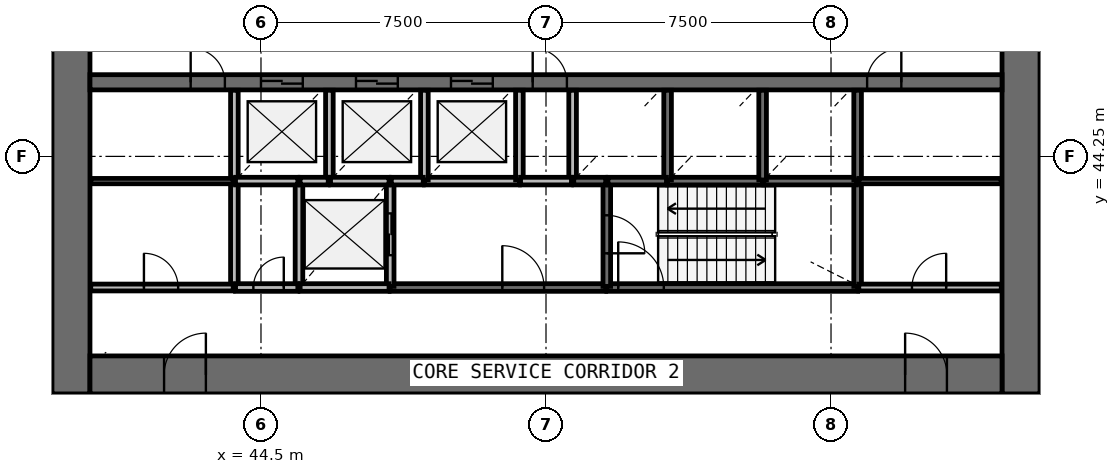
"""IFC4 building model, lengths in metres.
Left out: names, types, materials, properties, quantities, classifications, styles, units other than length and angle.
Written with IfcOpenShell. Run it as: python <this file> out.ifc"""

import sys

from ifc_helpers import new_model, si_unit, direction, frame, frame_2d, origin, place, context, subcontext, project, spatial, rectangle, extrude, source, transform, mapped, element, fill, save


model = new_model("IFC4")
c1 = context("Model", 3, precision=1e-05, world=origin(), true_north=direction((0.0, 1.0)))
c2 = subcontext(c1, "Body", "Model", "MODEL_VIEW")
j1 = project(units=[si_unit("LENGTHUNIT", "METRE"), si_unit("PLANEANGLEUNIT", "RADIAN")], contexts=[c1])
p1 = place(None, origin())
s1 = spatial("IfcSite", under=j1, at=p1, CompositionType="ELEMENT")
p2 = place(p1, origin())
s2 = spatial("IfcBuilding", under=s1, at=p2, CompositionType="ELEMENT")
p3 = place(p2, frame((0.0, 0.0, 49.0)))
s3 = spatial("IfcBuildingStorey", under=s2, at=p3, CompositionType="ELEMENT", Elevation=49.0)
p4 = place(p3, frame((64.5, 38.0, 0.0), z_axis=(0.0, 0.0, 1.0), x_axis=(0.0, 1.0, 0.0)))
e1 = element("IfcWall", 1, at=p4, inside=s3, PredefinedType="SHEAR", context=c2, shape_type="SweptSolid", body=[
    extrude(rectangle(XDim=20.0, YDim=1.0, at=frame_2d((10.0, 0.0))), origin(), (0.0, 0.0, 1.0), 4.4),
])
p5 = place(p4, frame((9.1, 0.0, 0.0)))
e2 = element("IfcOpeningElement", 2, at=p5, cuts=e1, PredefinedType="OPENING", context=c2, shape_type="SweptSolid", body=[
    extrude(rectangle(XDim=1.8, YDim=2.1, at=frame_2d((0.9, 1.05))), frame((0.0, 0.51, 0.0), z_axis=(0.0, -1.0, 0.0), x_axis=(1.0, 0.0, 0.0)), (0.0, 0.0, 1.0), 1.02),
])
p6 = place(p3, frame((39.5, 58.0, 0.0), z_axis=(0.0, 0.0, 1.0), x_axis=(0.0, -1.0, 0.0)))
e3 = element("IfcWall", 3, at=p6, inside=s3, PredefinedType="SHEAR", context=c2, shape_type="SweptSolid", body=[
    extrude(rectangle(XDim=20.0, YDim=1.0, at=frame_2d((10.0, 0.0))), origin(), (0.0, 0.0, 1.0), 4.4),
])
p7 = place(p6, frame((9.1, 0.0, 0.0)))
e4 = element("IfcOpeningElement", 4, at=p7, cuts=e3, PredefinedType="OPENING", context=c2, shape_type="SweptSolid", body=[
    extrude(rectangle(XDim=1.8, YDim=2.1, at=frame_2d((0.9, 1.05))), frame((0.0, 0.51, 0.0), z_axis=(0.0, -1.0, 0.0), x_axis=(1.0, 0.0, 0.0)), (0.0, 0.0, 1.0), 1.02),
])
p8 = place(p3, frame((40.0, 38.5, 0.0), z_axis=(0.0, 0.0, 1.0), x_axis=(1.0, 0.0, 0.0)))
e5 = element("IfcWall", 5, at=p8, inside=s3, PredefinedType="SHEAR", context=c2, shape_type="SweptSolid", body=[
    extrude(rectangle(XDim=24.0, YDim=1.0, at=frame_2d((12.0, 0.0))), origin(), (0.0, 0.0, 1.0), 4.4),
])
p9 = place(p8, frame((21.45, 0.0, 0.0)))
e6 = element("IfcOpeningElement", 6, at=p9, cuts=e5, PredefinedType="OPENING", context=c2, shape_type="SweptSolid", body=[
    extrude(rectangle(XDim=1.1, YDim=2.1, at=frame_2d((0.55, 1.05))), frame((0.0, 0.51, 0.0), z_axis=(0.0, -1.0, 0.0), x_axis=(1.0, 0.0, 0.0)), (0.0, 0.0, 1.0), 1.02),
])
p10 = place(p8, frame((1.95, 0.0, 0.0)))
e7 = element("IfcOpeningElement", 7, at=p10, cuts=e5, PredefinedType="OPENING", context=c2, shape_type="SweptSolid", body=[
    extrude(rectangle(XDim=1.1, YDim=2.1, at=frame_2d((0.55, 1.05))), frame((0.0, 0.51, 0.0), z_axis=(0.0, -1.0, 0.0), x_axis=(1.0, 0.0, 0.0)), (0.0, 0.0, 1.0), 1.02),
])
p11 = place(p3, frame((40.0, 46.2, 0.0), z_axis=(0.0, 0.0, 1.0), x_axis=(1.0, 0.0, 0.0)))
e8 = element("IfcWall", 8, at=p11, inside=s3, PredefinedType="SHEAR", context=c2, shape_type="SweptSolid", body=[
    extrude(rectangle(XDim=24.0, YDim=0.4, at=frame_2d((12.0, 0.0))), origin(), (0.0, 0.0, 1.0), 4.4),
])
p12 = place(p11, frame((4.5, 0.0, 0.0)))
e9 = element("IfcOpeningElement", 9, at=p12, cuts=e8, PredefinedType="OPENING", context=c2, shape_type="SweptSolid", body=[
    extrude(rectangle(XDim=1.1, YDim=2.1, at=frame_2d((0.55, 1.05))), frame((0.0, 0.21, 0.0), z_axis=(0.0, -1.0, 0.0), x_axis=(1.0, 0.0, 0.0)), (0.0, 0.0, 1.0), 0.42),
])
p13 = place(p11, frame((7.0, 0.0, 0.0)))
e10 = element("IfcOpeningElement", 10, at=p13, cuts=e8, PredefinedType="OPENING", context=c2, shape_type="SweptSolid", body=[
    extrude(rectangle(XDim=1.1, YDim=2.1, at=frame_2d((0.55, 1.05))), frame((0.0, 0.21, 0.0), z_axis=(0.0, -1.0, 0.0), x_axis=(1.0, 0.0, 0.0)), (0.0, 0.0, 1.0), 0.42),
])
p14 = place(p11, frame((9.5, 0.0, 0.0)))
e11 = element("IfcOpeningElement", 11, at=p14, cuts=e8, PredefinedType="OPENING", context=c2, shape_type="SweptSolid", body=[
    extrude(rectangle(XDim=1.1, YDim=2.1, at=frame_2d((0.55, 1.05))), frame((0.0, 0.21, 0.0), z_axis=(0.0, -1.0, 0.0), x_axis=(1.0, 0.0, 0.0)), (0.0, 0.0, 1.0), 0.42),
])
p15 = place(p11, frame((20.45, 0.0, 0.0)))
e12 = element("IfcOpeningElement", 12, at=p15, cuts=e8, PredefinedType="OPENING", context=c2, shape_type="SweptSolid", body=[
    extrude(rectangle(XDim=0.9, YDim=2.1, at=frame_2d((0.45, 1.05))), frame((0.0, 0.21, 0.0), z_axis=(0.0, -1.0, 0.0), x_axis=(1.0, 0.0, 0.0)), (0.0, 0.0, 1.0), 0.42),
])
p16 = place(p11, frame((2.65, 0.0, 0.0)))
e13 = element("IfcOpeningElement", 13, at=p16, cuts=e8, PredefinedType="OPENING", context=c2, shape_type="SweptSolid", body=[
    extrude(rectangle(XDim=0.9, YDim=2.1, at=frame_2d((0.45, 1.05))), frame((0.0, 0.21, 0.0), z_axis=(0.0, -1.0, 0.0), x_axis=(1.0, 0.0, 0.0)), (0.0, 0.0, 1.0), 0.42),
])
p17 = place(p11, frame((11.65, 0.0, 0.0)))
e14 = element("IfcOpeningElement", 14, at=p17, cuts=e8, PredefinedType="OPENING", context=c2, shape_type="SweptSolid", body=[
    extrude(rectangle(XDim=0.9, YDim=2.1, at=frame_2d((0.45, 1.05))), frame((0.0, 0.21, 0.0), z_axis=(0.0, -1.0, 0.0), x_axis=(1.0, 0.0, 0.0)), (0.0, 0.0, 1.0), 0.42),
])
p18 = place(p3, frame((53.6, 40.8, 0.0), z_axis=(0.0, 0.0, 1.0), x_axis=(1.0, 0.0, 0.0)))
e15 = element("IfcWall", 15, at=p18, inside=s3, PredefinedType="SOLIDWALL", context=c2, shape_type="SweptSolid", body=[
    extrude(rectangle(XDim=6.6, YDim=0.2, at=frame_2d((3.3, 0.0))), origin(), (0.0, 0.0, 1.0), 3.95),
])
p19 = place(p18, frame((0.3, 0.0, 0.0)))
e16 = element("IfcOpeningElement", 16, at=p19, cuts=e15, PredefinedType="OPENING", context=c2, shape_type="SweptSolid", body=[
    extrude(rectangle(XDim=1.2, YDim=2.1, at=frame_2d((0.6, 1.05))), frame((0.0, 0.11, 0.0), z_axis=(0.0, -1.0, 0.0), x_axis=(1.0, 0.0, 0.0)), (0.0, 0.0, 1.0), 0.22),
])
p20 = place(p3, frame((47.9, 40.8, 0.0), z_axis=(0.0, 0.0, 1.0), x_axis=(1.0, 0.0, 0.0)))
e17 = element("IfcWall", 17, at=p20, inside=s3, PredefinedType="SOLIDWALL", context=c2, shape_type="SweptSolid", body=[
    extrude(rectangle(XDim=5.67, YDim=0.2, at=frame_2d((2.835, 0.0))), origin(), (0.0, 0.0, 1.0), 3.95),
])
p21 = place(p20, frame((2.95, 0.0, 0.0)))
e18 = element("IfcOpeningElement", 18, at=p21, cuts=e17, PredefinedType="OPENING", context=c2, shape_type="SweptSolid", body=[
    extrude(rectangle(XDim=1.1, YDim=2.1, at=frame_2d((0.55, 1.05))), frame((0.0, 0.11, 0.0), z_axis=(0.0, -1.0, 0.0), x_axis=(1.0, 0.0, 0.0)), (0.0, 0.0, 1.0), 0.22),
])
for number, where, z_axis, x_axis in (
    (19, (43.8, 43.6, 0.0), (0.0, 0.0, 1.0), (0.0, -1.0, 0.0)),
    (20, (45.5, 43.6, 0.0), (0.0, 0.0, 1.0), (0.0, -1.0, 0.0)),
):
    element("IfcWall", number, at=place(p3, frame(where, z_axis=z_axis, x_axis=x_axis)), inside=s3, PredefinedType="SOLIDWALL", context=c2, shape_type="SweptSolid", body=[
        extrude(rectangle(XDim=2.8, YDim=0.2, at=frame_2d((1.4, 0.0))), origin(), (0.0, 0.0, 1.0), 3.95),
    ])
p22 = place(p3, frame((47.9, 40.83, 0.0), z_axis=(0.0, 0.0, 1.0), x_axis=(0.0, 1.0, 0.0)))
e21 = element("IfcWall", 21, at=p22, inside=s3, PredefinedType="SOLIDWALL", context=c2, shape_type="SweptSolid", body=[
    extrude(rectangle(XDim=2.77, YDim=0.2, at=frame_2d((1.385, 0.0))), origin(), (0.0, 0.0, 1.0), 3.95),
])
p23 = place(p22, frame((0.82, 0.0, 0.0)))
e22 = element("IfcOpeningElement", 22, at=p23, cuts=e21, PredefinedType="OPENING", context=c2, shape_type="SweptSolid", body=[
    extrude(rectangle(XDim=1.1, YDim=2.1, at=frame_2d((0.55, 1.05))), frame((0.0, 0.11, 0.0), z_axis=(0.0, -1.0, 0.0), x_axis=(1.0, 0.0, 0.0)), (0.0, 0.0, 1.0), 0.22),
])
p24 = place(p3, frame((60.2, 40.83, 0.0), z_axis=(0.0, 0.0, 1.0), x_axis=(0.0, 1.0, 0.0)))
e23 = element("IfcWall", 23, at=p24, inside=s3, PredefinedType="SOLIDWALL", context=c2, shape_type="SweptSolid", body=[
    extrude(rectangle(XDim=2.77, YDim=0.2, at=frame_2d((1.385, 0.0))), origin(), (0.0, 0.0, 1.0), 3.95),
])
p25 = place(p3, frame((53.6, 43.6, 0.0), z_axis=(0.0, 0.0, 1.0), x_axis=(0.0, -1.0, 0.0)))
e24 = element("IfcWall", 24, at=p25, inside=s3, PredefinedType="SOLIDWALL", context=c2, shape_type="SweptSolid", body=[
    extrude(rectangle(XDim=2.77, YDim=0.2, at=frame_2d((1.385, 0.0))), origin(), (0.0, 0.0, 1.0), 3.95),
])
p26 = place(p25, frame((0.9, 0.0, 0.0)))
e25 = element("IfcOpeningElement", 25, at=p26, cuts=e24, PredefinedType="OPENING", context=c2, shape_type="SweptSolid", body=[
    extrude(rectangle(XDim=1.0, YDim=2.1, at=frame_2d((0.5, 1.05))), frame((0.0, 0.11, 0.0), z_axis=(0.0, -1.0, 0.0), x_axis=(1.0, 0.0, 0.0)), (0.0, 0.0, 1.0), 0.22),
])
for number, where, z_axis, x_axis in (
    (26, (48.8, 43.6, 0.0), (0.0, 0.0, 1.0), (1.0, 0.0, 0.0)),
    (27, (55.2, 43.6, 0.0), (0.0, 0.0, 1.0), (1.0, 0.0, 0.0)),
):
    element("IfcWall", number, at=place(p3, frame(where, z_axis=z_axis, x_axis=x_axis)), inside=s3, PredefinedType="SOLIDWALL", context=c2, shape_type="SweptSolid", body=[
        extrude(rectangle(XDim=2.5, YDim=0.2, at=frame_2d((1.25, 0.0))), origin(), (0.0, 0.0, 1.0), 3.95),
    ])
p27 = place(p3, frame((57.73, 43.6, 0.0), z_axis=(0.0, 0.0, 1.0), x_axis=(1.0, 0.0, 0.0)))
e28 = element("IfcWall", 28, at=p27, inside=s3, PredefinedType="SOLIDWALL", context=c2, shape_type="SweptSolid", body=[
    extrude(rectangle(XDim=2.44, YDim=0.2, at=frame_2d((1.22, 0.0))), origin(), (0.0, 0.0, 1.0), 3.95),
])
p28 = place(p3, frame((45.53, 40.8, 0.0), z_axis=(0.0, 0.0, 1.0), x_axis=(1.0, 0.0, 0.0)))
e29 = element("IfcWall", 29, at=p28, inside=s3, PredefinedType="SOLIDWALL", context=c2, shape_type="SweptSolid", body=[
    extrude(rectangle(XDim=2.34, YDim=0.2, at=frame_2d((1.17, 0.0))), origin(), (0.0, 0.0, 1.0), 3.95),
])
p29 = place(p3, frame((43.8, 45.99, 0.0), z_axis=(0.0, 0.0, 1.0), x_axis=(0.0, -1.0, 0.0)))
e30 = element("IfcWall", 30, at=p29, inside=s3, PredefinedType="SOLIDWALL", context=c2, shape_type="SweptSolid", body=[
    extrude(rectangle(XDim=2.36, YDim=0.2, at=frame_2d((1.18, 0.0))), origin(), (0.0, 0.0, 1.0), 3.95),
])
p30 = place(p3, frame((46.3, 43.6, 0.0), z_axis=(0.0, 0.0, 1.0), x_axis=(0.0, 1.0, 0.0)))
e31 = element("IfcWall", 31, at=p30, inside=s3, PredefinedType="SOLIDWALL", context=c2, shape_type="SweptSolid", body=[
    extrude(rectangle(XDim=2.39, YDim=0.2, at=frame_2d((1.195, 0.0))), origin(), (0.0, 0.0, 1.0), 3.95),
])
for number, where, z_axis, x_axis in (
    (32, (48.8, 43.63, 0.0), (0.0, 0.0, 1.0), (0.0, 1.0, 0.0)),
    (33, (51.3, 43.63, 0.0), (0.0, 0.0, 1.0), (0.0, 1.0, 0.0)),
):
    element("IfcWall", number, at=place(p3, frame(where, z_axis=z_axis, x_axis=x_axis)), inside=s3, PredefinedType="SOLIDWALL", context=c2, shape_type="SweptSolid", body=[
        extrude(rectangle(XDim=2.36, YDim=0.2, at=frame_2d((1.18, 0.0))), origin(), (0.0, 0.0, 1.0), 3.95),
    ])
p31 = place(p3, frame((52.7, 45.99, 0.0), z_axis=(0.0, 0.0, 1.0), x_axis=(0.0, -1.0, 0.0)))
e34 = element("IfcWall", 34, at=p31, inside=s3, PredefinedType="SOLIDWALL", context=c2, shape_type="SweptSolid", body=[
    extrude(rectangle(XDim=2.39, YDim=0.2, at=frame_2d((1.195, 0.0))), origin(), (0.0, 0.0, 1.0), 3.95),
])
for number, where, z_axis, x_axis in (
    (35, (55.2, 43.63, 0.0), (0.0, 0.0, 1.0), (0.0, 1.0, 0.0)),
    (36, (57.7, 43.63, 0.0), (0.0, 0.0, 1.0), (0.0, 1.0, 0.0)),
    (37, (60.2, 43.63, 0.0), (0.0, 0.0, 1.0), (0.0, 1.0, 0.0)),
):
    element("IfcWall", number, at=place(p3, frame(where, z_axis=z_axis, x_axis=x_axis)), inside=s3, PredefinedType="SOLIDWALL", context=c2, shape_type="SweptSolid", body=[
        extrude(rectangle(XDim=2.36, YDim=0.2, at=frame_2d((1.18, 0.0))), origin(), (0.0, 0.0, 1.0), 3.95),
    ])
p32 = place(p3, frame((43.83, 43.6, 0.0), z_axis=(0.0, 0.0, 1.0), x_axis=(1.0, 0.0, 0.0)))
e38 = element("IfcWall", 38, at=p32, inside=s3, PredefinedType="SOLIDWALL", context=c2, shape_type="SweptSolid", body=[
    extrude(rectangle(XDim=1.64, YDim=0.2, at=frame_2d((0.82, 0.0))), origin(), (0.0, 0.0, 1.0), 3.95),
])
p33 = place(p3, frame((43.83, 40.8, 0.0), z_axis=(0.0, 0.0, 1.0), x_axis=(1.0, 0.0, 0.0)))
e39 = element("IfcWall", 39, at=p33, inside=s3, PredefinedType="SOLIDWALL", context=c2, shape_type="SweptSolid", body=[
    extrude(rectangle(XDim=1.64, YDim=0.2, at=frame_2d((0.82, 0.0))), origin(), (0.0, 0.0, 1.0), 3.95),
])
p34 = place(p33, frame((0.47, 0.0, 0.0)))
e40 = element("IfcOpeningElement", 40, at=p34, cuts=e39, PredefinedType="OPENING", context=c2, shape_type="SweptSolid", body=[
    extrude(rectangle(XDim=0.8, YDim=2.1, at=frame_2d((0.4, 1.05))), frame((0.0, 0.11, 0.0), z_axis=(0.0, -1.0, 0.0), x_axis=(1.0, 0.0, 0.0)), (0.0, 0.0, 1.0), 0.22),
])
for number, where, z_axis, x_axis in (
    (41, (46.33, 43.6, 0.0), (0.0, 0.0, 1.0), (1.0, 0.0, 0.0)),
    (42, (53.63, 43.6, 0.0), (0.0, 0.0, 1.0), (1.0, 0.0, 0.0)),
):
    element("IfcWall", number, at=place(p3, frame(where, z_axis=z_axis, x_axis=x_axis)), inside=s3, PredefinedType="SOLIDWALL", context=c2, shape_type="SweptSolid", body=[
        extrude(rectangle(XDim=1.54, YDim=0.2, at=frame_2d((0.77, 0.0))), origin(), (0.0, 0.0, 1.0), 3.95),
    ])
p35 = place(p3, frame((52.67, 43.6, 0.0), z_axis=(0.0, 0.0, 1.0), x_axis=(-1.0, 0.0, 0.0)))
e43 = element("IfcWall", 43, at=p35, inside=s3, PredefinedType="SOLIDWALL", context=c2, shape_type="SweptSolid", body=[
    extrude(rectangle(XDim=1.34, YDim=0.2, at=frame_2d((0.67, 0.0))), origin(), (0.0, 0.0, 1.0), 3.95),
])
for number, where, z_axis, x_axis in (
    (44, (47.93, 43.6, 0.0), (0.0, 0.0, 1.0), (1.0, 0.0, 0.0)),
    (45, (52.73, 43.6, 0.0), (0.0, 0.0, 1.0), (1.0, 0.0, 0.0)),
):
    element("IfcWall", number, at=place(p3, frame(where, z_axis=z_axis, x_axis=x_axis)), inside=s3, PredefinedType="SOLIDWALL", context=c2, shape_type="SweptSolid", body=[
        extrude(rectangle(XDim=0.84, YDim=0.2, at=frame_2d((0.42, 0.0))), origin(), (0.0, 0.0, 1.0), 3.95),
    ])
p36 = place(p3, frame((45.53, 43.6, 0.0), z_axis=(0.0, 0.0, 1.0), x_axis=(1.0, 0.0, 0.0)))
e46 = element("IfcWall", 46, at=p36, inside=s3, PredefinedType="SOLIDWALL", context=c2, shape_type="SweptSolid", body=[
    extrude(rectangle(XDim=0.74, YDim=0.2, at=frame_2d((0.37, 0.0))), origin(), (0.0, 0.0, 1.0), 3.95),
])
p37 = place(p3, frame((40.02, 40.8, 0.0), z_axis=(0.0, 0.0, 1.0), x_axis=(1.0, 0.0, 0.0)))
e47 = element("IfcWall", 47, at=p37, inside=s3, PredefinedType="PARTITIONING", context=c2, shape_type="SweptSolid", body=[
    extrude(rectangle(XDim=3.75, YDim=0.18, at=frame_2d((1.875, 0.0))), origin(), (0.0, 0.0, 1.0), 3.95),
])
p38 = place(p37, frame((1.4, 0.0, 0.0)))
e48 = element("IfcOpeningElement", 48, at=p38, cuts=e47, PredefinedType="OPENING", context=c2, shape_type="SweptSolid", body=[
    extrude(rectangle(XDim=0.9, YDim=2.1, at=frame_2d((0.45, 1.05))), frame((0.0, 0.1, 0.0), z_axis=(0.0, -1.0, 0.0), x_axis=(1.0, 0.0, 0.0)), (0.0, 0.0, 1.0), 0.2),
])
p39 = place(p3, frame((60.23, 40.8, 0.0), z_axis=(0.0, 0.0, 1.0), x_axis=(1.0, 0.0, 0.0)))
e49 = element("IfcWall", 49, at=p39, inside=s3, PredefinedType="PARTITIONING", context=c2, shape_type="SweptSolid", body=[
    extrude(rectangle(XDim=3.75, YDim=0.18, at=frame_2d((1.875, 0.0))), origin(), (0.0, 0.0, 1.0), 3.95),
])
p40 = place(p39, frame((1.4, 0.0, 0.0)))
e50 = element("IfcOpeningElement", 50, at=p40, cuts=e49, PredefinedType="OPENING", context=c2, shape_type="SweptSolid", body=[
    extrude(rectangle(XDim=0.9, YDim=2.1, at=frame_2d((0.45, 1.05))), frame((0.0, 0.1, 0.0), z_axis=(0.0, -1.0, 0.0), x_axis=(1.0, 0.0, 0.0)), (0.0, 0.0, 1.0), 0.2),
])
for number, where, z_axis, x_axis in (
    (51, (43.77, 43.6, 0.0), (0.0, 0.0, 1.0), (-1.0, 0.0, 0.0)),
    (52, (60.23, 43.6, 0.0), (0.0, 0.0, 1.0), (1.0, 0.0, 0.0)),
):
    element("IfcWall", number, at=place(p3, frame(where, z_axis=z_axis, x_axis=x_axis)), inside=s3, PredefinedType="PARTITIONING", context=c2, shape_type="SweptSolid", body=[
        extrude(rectangle(XDim=3.75, YDim=0.14, at=frame_2d((1.875, 0.0))), origin(), (0.0, 0.0, 1.0), 3.05),
    ])
m1 = source(origin(), c2, "Body", "SweptSolid", [
    extrude(rectangle(XDim=1.1, YDim=2.1, at=frame_2d((0.55, 1.05))), frame((0.0, 0.025, 0.0), z_axis=(0.0, -1.0, 0.0), x_axis=(1.0, 0.0, 0.0)), (0.0, 0.0, 1.0), 0.05),
])
p41 = place(p12, origin())
e53 = element("IfcDoor", 53, at=p41, inside=s3, OperationType="DOUBLE_DOOR_SLIDING", PredefinedType="USERDEFINED", context=c2, shape_type="MappedRepresentation", body=[
    mapped(m1, transform((0.0, 0.0, 0.0), scale=1.0)),
])
fill(e9, e53)
p42 = place(p13, origin())
e54 = element("IfcDoor", 54, at=p42, inside=s3, OperationType="DOUBLE_DOOR_SLIDING", PredefinedType="USERDEFINED", context=c2, shape_type="MappedRepresentation", body=[
    mapped(m1, transform((0.0, 0.0, 0.0), scale=1.0)),
])
fill(e10, e54)
p43 = place(p14, origin())
e55 = element("IfcDoor", 55, at=p43, inside=s3, OperationType="DOUBLE_DOOR_SLIDING", PredefinedType="USERDEFINED", context=c2, shape_type="MappedRepresentation", body=[
    mapped(m1, transform((0.0, 0.0, 0.0), scale=1.0)),
])
fill(e11, e55)
p44 = place(p23, origin())
e56 = element("IfcDoor", 56, at=p44, inside=s3, OperationType="DOUBLE_DOOR_SLIDING", PredefinedType="USERDEFINED", context=c2, shape_type="MappedRepresentation", body=[
    mapped(m1, transform((0.0, 0.0, 0.0), scale=1.0)),
])
fill(e22, e56)
m2 = source(origin(), c2, "Body", "SweptSolid", [
    extrude(rectangle(XDim=1.2, YDim=2.1, at=frame_2d((0.6, 1.05))), frame((0.0, 0.025, 0.0), z_axis=(0.0, -1.0, 0.0), x_axis=(1.0, 0.0, 0.0)), (0.0, 0.0, 1.0), 0.05),
])
p45 = place(p19, origin())
e57 = element("IfcDoor", 57, at=p45, inside=s3, OperationType="SINGLE_SWING_LEFT", PredefinedType="DOOR", context=c2, shape_type="MappedRepresentation", body=[
    mapped(m2, transform((0.0, 0.0, 0.0), scale=1.0)),
])
fill(e16, e57)
m3 = source(origin(), c2, "Body", "SweptSolid", [
    extrude(rectangle(XDim=1.0, YDim=2.1, at=frame_2d((0.5, 1.05))), frame((0.0, 0.025, 0.0), z_axis=(0.0, -1.0, 0.0), x_axis=(1.0, 0.0, 0.0)), (0.0, 0.0, 1.0), 0.05),
])
p46 = place(p26, origin())
e58 = element("IfcDoor", 58, at=p46, inside=s3, OperationType="SINGLE_SWING_RIGHT", PredefinedType="DOOR", context=c2, shape_type="MappedRepresentation", body=[
    mapped(m3, transform((0.0, 0.0, 0.0), scale=1.0)),
])
fill(e25, e58)
m4 = source(origin(), c2, "Body", "SweptSolid", [
    extrude(rectangle(XDim=1.1, YDim=2.1, at=frame_2d((0.55, 1.05))), frame((0.0, 0.025, 0.0), z_axis=(0.0, -1.0, 0.0), x_axis=(1.0, 0.0, 0.0)), (0.0, 0.0, 1.0), 0.05),
])
p47 = place(p21, origin())
e59 = element("IfcDoor", 59, at=p47, inside=s3, OperationType="SINGLE_SWING_LEFT", PredefinedType="DOOR", context=c2, shape_type="MappedRepresentation", body=[
    mapped(m4, transform((0.0, 0.0, 0.0), scale=1.0)),
])
fill(e18, e59)
m5 = source(origin(), c2, "Body", "SweptSolid", [
    extrude(rectangle(XDim=0.8, YDim=2.1, at=frame_2d((0.4, 1.05))), frame((0.0, 0.025, 0.0), z_axis=(0.0, -1.0, 0.0), x_axis=(1.0, 0.0, 0.0)), (0.0, 0.0, 1.0), 0.05),
])
p48 = place(p34, origin())
e60 = element("IfcDoor", 60, at=p48, inside=s3, OperationType="SINGLE_SWING_RIGHT", PredefinedType="DOOR", context=c2, shape_type="MappedRepresentation", body=[
    mapped(m5, transform((0.0, 0.0, 0.0), scale=1.0)),
])
fill(e40, e60)
m6 = source(origin(), c2, "Body", "SweptSolid", [
    extrude(rectangle(XDim=1.1, YDim=2.1, at=frame_2d((0.55, 1.05))), frame((0.0, 0.025, 0.0), z_axis=(0.0, -1.0, 0.0), x_axis=(1.0, 0.0, 0.0)), (0.0, 0.0, 1.0), 0.05),
])
p49 = place(p9, origin())
e61 = element("IfcDoor", 61, at=p49, inside=s3, OperationType="SINGLE_SWING_LEFT", PredefinedType="DOOR", context=c2, shape_type="MappedRepresentation", body=[
    mapped(m6, transform((0.0, 0.0, 0.0), scale=1.0)),
])
fill(e6, e61)
p50 = place(p10, origin())
e62 = element("IfcDoor", 62, at=p50, inside=s3, OperationType="SINGLE_SWING_RIGHT", PredefinedType="DOOR", context=c2, shape_type="MappedRepresentation", body=[
    mapped(m6, transform((0.0, 0.0, 0.0), scale=1.0)),
])
fill(e7, e62)
m7 = source(origin(), c2, "Body", "SweptSolid", [
    extrude(rectangle(XDim=0.9, YDim=2.1, at=frame_2d((0.45, 1.05))), frame((0.0, 0.025, 0.0), z_axis=(0.0, -1.0, 0.0), x_axis=(1.0, 0.0, 0.0)), (0.0, 0.0, 1.0), 0.05),
])
p51 = place(p38, origin())
e63 = element("IfcDoor", 63, at=p51, inside=s3, OperationType="SINGLE_SWING_LEFT", PredefinedType="DOOR", context=c2, shape_type="MappedRepresentation", body=[
    mapped(m7, transform((0.0, 0.0, 0.0), scale=1.0)),
])
fill(e48, e63)
p52 = place(p15, origin())
e64 = element("IfcDoor", 64, at=p52, inside=s3, OperationType="SINGLE_SWING_RIGHT", PredefinedType="DOOR", context=c2, shape_type="MappedRepresentation", body=[
    mapped(m7, transform((0.0, 0.0, 0.0), scale=1.0)),
])
fill(e12, e64)
p53 = place(p40, origin())
e65 = element("IfcDoor", 65, at=p53, inside=s3, OperationType="SINGLE_SWING_RIGHT", PredefinedType="DOOR", context=c2, shape_type="MappedRepresentation", body=[
    mapped(m7, transform((0.0, 0.0, 0.0), scale=1.0)),
])
fill(e50, e65)
p54 = place(p16, origin())
e66 = element("IfcDoor", 66, at=p54, inside=s3, OperationType="SINGLE_SWING_LEFT", PredefinedType="DOOR", context=c2, shape_type="MappedRepresentation", body=[
    mapped(m7, transform((0.0, 0.0, 0.0), scale=1.0)),
])
fill(e13, e66)
p55 = place(p17, origin())
e67 = element("IfcDoor", 67, at=p55, inside=s3, OperationType="SINGLE_SWING_LEFT", PredefinedType="DOOR", context=c2, shape_type="MappedRepresentation", body=[
    mapped(m7, transform((0.0, 0.0, 0.0), scale=1.0)),
])
fill(e14, e67)
save(model, sys.argv[1])
